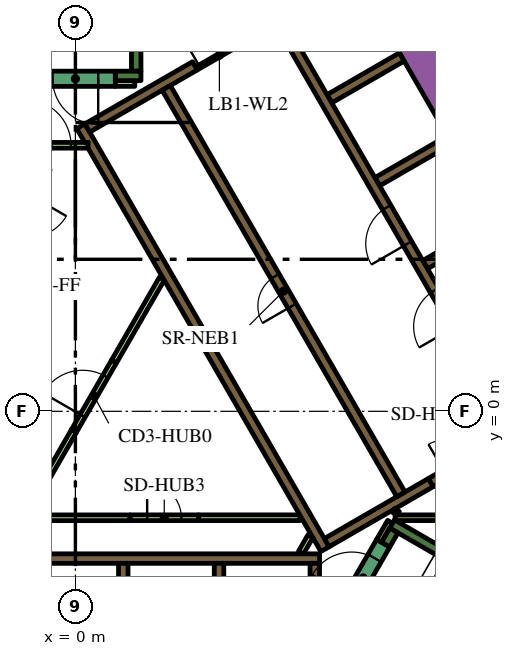
"""IFC4 building model, lengths in metres.
Left out: names, types, materials, properties, quantities, classifications, styles, units other than length and angle.
Written with IfcOpenShell. Run it as: python <this file> out.ifc"""

import sys

from ifc_helpers import new_model, si_unit, direction, frame, frame_2d, origin, place, context, subcontext, project, spatial, polyline, rectangle, outline, extrude, element, fill, save


model = new_model("IFC4")
c1 = context("Model", 3, precision=1e-05, world=origin(), true_north=direction((0.0, 1.0)))
c2 = subcontext(c1, "Body", "Model", "MODEL_VIEW")
j1 = project(units=[si_unit("LENGTHUNIT", "METRE"), si_unit("PLANEANGLEUNIT", "RADIAN")], contexts=[c1])
p1 = place(None, origin())
s1 = spatial("IfcSite", under=j1, at=p1, CompositionType="ELEMENT")
p2 = place(p1, origin())
s2 = spatial("IfcBuilding", under=s1, at=p2, CompositionType="ELEMENT")
p3 = place(p2, frame((0.0, 0.0, 58.8)))
s3 = spatial("IfcBuildingStorey", under=s2, at=p3, CompositionType="ELEMENT", Elevation=58.8)
p4 = place(p3, frame((6.776, 13.364, 0.0), z_axis=(0.0, 0.0, 1.0), x_axis=(0.500004177138, -0.8660229921, 0.0)))
e1 = element("IfcWall", 1, at=p4, inside=s3, PredefinedType="SOLIDWALL", context=c2, shape_type="SweptSolid", body=[
    extrude(rectangle(XDim=20.204, YDim=0.9, at=frame_2d((10.102, 0.0))), origin(), (0.0, 0.0, 1.0), 3.9),
])
p5 = place(p3, frame((8.334, -2.964, 0.0), z_axis=(0.0, 0.0, 1.0), x_axis=(0.866016039709, -0.500016218704, 0.0)))
e2 = element("IfcWall", 2, at=p5, inside=s3, PredefinedType="SOLIDWALL", context=c2, shape_type="SweptSolid", body=[
    extrude(rectangle(XDim=7.05, YDim=0.25, at=frame_2d((3.525, 0.0))), origin(), (0.0, 0.0, 1.0), 3.9),
])
p6 = place(p3, frame((8.163, -3.511, 0.0), z_axis=(0.0, 0.0, 1.0), x_axis=(0.500127794843, 0.865951608824, 0.0)))
e3 = element("IfcWall", 3, at=p6, inside=s3, PredefinedType="SOLIDWALL", context=c2, shape_type="SweptSolid", body=[
    extrude(rectangle(XDim=0.435, YDim=0.25, at=frame_2d((0.217, 0.0))), origin(), (0.0, 0.0, 1.0), 3.9),
])
p7 = place(p3, frame((1.6, 8.95, 0.0), z_axis=(0.0, 0.0, 1.0), x_axis=(0.0, 1.0, 0.0)))
e4 = element("IfcWall", 4, at=p7, inside=s3, PredefinedType="SOLIDWALL", context=c2, shape_type="SweptSolid", body=[
    extrude(rectangle(XDim=6.8, YDim=0.25, at=frame_2d((3.4, 0.0))), origin(), (0.0, 0.0, 1.0), 3.9),
])
p8 = place(p3, frame((1.05, 8.825, 0.0), z_axis=(0.0, 0.0, 1.0), x_axis=(1.0, 0.0, 0.0)))
e5 = element("IfcWall", 5, at=p8, inside=s3, PredefinedType="SOLIDWALL", context=c2, shape_type="SweptSolid", body=[
    extrude(rectangle(XDim=0.675, YDim=0.25, at=frame_2d((0.337, 0.0))), origin(), (0.0, 0.0, 1.0), 3.9),
])
p9 = place(p3, frame((-6.19, -3.875, 0.0), z_axis=(0.0, 0.0, 1.0), x_axis=(1.0, 0.0, 0.0)))
e6 = element("IfcWall", 6, at=p9, inside=s3, PredefinedType="SOLIDWALL", context=c2, shape_type="SweptSolid", body=[
    extrude(rectangle(XDim=12.615, YDim=0.25, at=frame_2d((6.307, 0.0))), origin(), (0.0, 0.0, 1.0), 3.9),
])
p10 = place(p3, frame((6.3, -7.268, 0.0), z_axis=(0.0, 0.0, 1.0), x_axis=(0.0, 1.0, 0.0)))
e7 = element("IfcWall", 7, at=p10, inside=s3, PredefinedType="SOLIDWALL", context=c2, shape_type="SweptSolid", body=[
    extrude(rectangle(XDim=3.268, YDim=0.25, at=frame_2d((1.634, 0.0))), origin(), (0.0, 0.0, 1.0), 3.9),
])
for number, where, z_axis, x_axis in (
    (8, (3.78, -4.0, 0.0), (0.0, 0.0, 1.0), (0.0, -1.0, 0.0)),
    (9, (1.26, -4.0, 0.0), (0.0, 0.0, 1.0), (0.0, -1.0, 0.0)),
):
    element("IfcWall", number, at=place(p3, frame(where, z_axis=z_axis, x_axis=x_axis)), inside=s3, PredefinedType="SOLIDWALL", context=c2, shape_type="SweptSolid", body=[
        extrude(rectangle(XDim=2.2, YDim=0.25, at=frame_2d((1.1, 0.0))), origin(), (0.0, 0.0, 1.0), 3.9),
    ])
p11 = place(p3, origin())
e10 = element("IfcWall", 10, at=p11, inside=s3, PredefinedType="SOLIDWALL", context=c2, shape_type="SweptSolid", body=[
    extrude(outline(polyline([(0.335, 6.925), (0.335, 6.925), (0.335, 7.075), (0.335, 7.075), (0.335, 7.075), (0.245, 7.075), (0.079, 7.363), (0.035, 7.439), (0.252, 7.564), (0.377, 7.348), (6.552, -3.348), (6.677, -3.564), (6.46, -3.689), (4.897, -0.981), (0.332, 6.925), (0.335, 6.925), (0.335, 6.925)])), origin(), (0.0, 0.0, 1.0), 3.9),
])
p12 = place(p3, frame((0.314, 7.456, 0.0), z_axis=(0.0, 0.0, 1.0), x_axis=(0.866013897511, 0.50001992892, 0.0)))
e11 = element("IfcWall", 11, at=p12, inside=s3, PredefinedType="SOLIDWALL", context=c2, shape_type="SweptSolid", body=[
    extrude(rectangle(XDim=3.268, YDim=0.25, at=frame_2d((1.634, 0.0))), origin(), (0.0, 0.0, 1.0), 3.9),
])
p13 = place(p3, frame((9.352, -1.875, 0.0), z_axis=(0.0, 0.0, 1.0), x_axis=(-0.866024844342, -0.500000968981, 0.0)))
e12 = element("IfcWall", 12, at=p13, inside=s3, PredefinedType="SOLIDWALL", context=c2, shape_type="SweptSolid", body=[
    extrude(rectangle(XDim=3.162, YDim=0.25, at=frame_2d((1.581, 0.0))), origin(), (0.0, 0.0, 1.0), 3.9),
])
for number, where, z_axis, x_axis in (
    (13, (6.684, 8.224, 0.0), (0.0, 0.0, 1.0), (0.866, 0.5, 0.0)),
    (14, (7.944, 6.041, 0.0), (0.0, 0.0, 1.0), (0.866, 0.5, 0.0)),
    (15, (9.204, 3.859, 0.0), (0.0, 0.0, 1.0), (0.866, 0.5, 0.0)),
):
    element("IfcWall", number, at=place(p3, frame(where, z_axis=z_axis, x_axis=x_axis)), inside=s3, PredefinedType="SOLIDWALL", context=c2, shape_type="SweptSolid", body=[
        extrude(rectangle(XDim=2.2, YDim=0.25, at=frame_2d((1.1, 0.0))), origin(), (0.0, 0.0, 1.0), 3.9),
    ])
p14 = place(p3, frame((-6.086, -2.801, 0.0), z_axis=(0.0, 0.0, 1.0), x_axis=(1.0, 0.0, 0.0)))
e16 = element("IfcWall", 16, at=p14, inside=s3, PredefinedType="PARTITIONING", context=c2, shape_type="SweptSolid", body=[
    extrude(rectangle(XDim=7.524, YDim=0.15, at=frame_2d((3.762, 0.0))), origin(), (0.0, 0.0, 1.0), 2.75),
])
p15 = place(p3, frame((-1.208, -2.544, 0.0), z_axis=(0.0, 0.0, 1.0), x_axis=(0.499995339376, 0.86602809458, 0.0)))
e17 = element("IfcWall", 17, at=p15, inside=s3, PredefinedType="PARTITIONING", context=c2, shape_type="SweptSolid", body=[
    extrude(rectangle(XDim=2.349, YDim=0.15, at=frame_2d((1.175, 0.0))), origin(), (0.0, 0.0, 1.0), 2.75),
])
p16 = place(p3, frame((5.936, -3.718, 0.0), z_axis=(0.0, 0.0, 1.0), x_axis=(0.499890179513, 0.866088799389, 0.0)))
e18 = element("IfcWall", 18, at=p16, inside=s3, PredefinedType="PARTITIONING", context=c2, shape_type="SweptSolid", body=[
    extrude(rectangle(XDim=0.504, YDim=0.15, at=frame_2d((0.252, 0.0))), origin(), (0.0, 0.0, 1.0), 2.75),
])
p17 = place(p3, frame((8.412, -2.8, 0.0), z_axis=(0.0, 0.0, 1.0), x_axis=(1.0, 0.0, 0.0)))
e19 = element("IfcWall", 19, at=p17, inside=s3, PredefinedType="PARTITIONING", context=c2, shape_type="SweptSolid", body=[
    extrude(rectangle(XDim=2.702, YDim=0.15, at=frame_2d((1.351, 0.0))), origin(), (0.0, 0.0, 1.0), 3.9),
])
p18 = place(p3, frame((8.459, -2.599, 0.0), z_axis=(0.0, 0.0, 1.0), x_axis=(-0.501919277433, -0.864914469148, 0.0)))
e20 = element("IfcWall", 20, at=p18, inside=s3, PredefinedType="PARTITIONING", context=c2, shape_type="SweptSolid", body=[
    extrude(rectangle(XDim=0.109, YDim=0.15, at=frame_2d((0.054, 0.0))), origin(), (0.0, 0.0, 1.0), 3.9),
])
p19 = place(p3, frame((8.281, -2.907, 0.0), z_axis=(0.0, 0.0, 1.0), x_axis=(-0.500193841991, -0.86591346013, 0.0)))
e21 = element("IfcWall", 21, at=p19, inside=s3, PredefinedType="PARTITIONING", context=c2, shape_type="SweptSolid", body=[
    extrude(rectangle(XDim=0.583, YDim=0.15, at=frame_2d((0.292, 0.0))), origin(), (0.0, 0.0, 1.0), 3.9),
])
p20 = place(p3, frame((3.238, -2.8, 0.0), z_axis=(0.0, 0.0, 1.0), x_axis=(1.0, 0.0, 0.0)))
e22 = element("IfcWall", 22, at=p20, inside=s3, PredefinedType="PARTITIONING", context=c2, shape_type="SweptSolid", body=[
    extrude(rectangle(XDim=2.672, YDim=0.15, at=frame_2d((1.336, 0.0))), origin(), (0.0, 0.0, 1.0), 2.75),
])
p21 = place(p3, frame((1.016, 1.309, 0.0), z_axis=(0.0, 0.0, 1.0), x_axis=(0.49998231768, 0.866035612436, 0.0)))
e23 = element("IfcWall", 23, at=p21, inside=s3, PredefinedType="PARTITIONING", context=c2, shape_type="SweptSolid", body=[
    extrude(rectangle(XDim=2.521, YDim=0.15, at=frame_2d((1.26, 0.0))), origin(), (0.0, 0.0, 1.0), 2.75),
])
p22 = place(p3, frame((1.05, 8.625, 0.0), z_axis=(0.0, 0.0, 1.0), x_axis=(1.0, 0.0, 0.0)))
e24 = element("IfcWall", 24, at=p22, inside=s3, PredefinedType="PARTITIONING", context=c2, shape_type="SweptSolid", body=[
    extrude(rectangle(XDim=0.514, YDim=0.15, at=frame_2d((0.257, 0.0))), origin(), (0.0, 0.0, 1.0), 2.75),
])
p23 = place(p3, frame((11.553, -0.46, 0.0), z_axis=(0.0, 0.0, 1.0), x_axis=(-0.500006514828, 0.866021642414, 0.0)))
e25 = element("IfcWall", 25, at=p23, inside=s3, PredefinedType="SOLIDWALL", context=c2, shape_type="SweptSolid", body=[
    extrude(rectangle(XDim=12.35, YDim=0.25, at=frame_2d((6.175, 0.0))), origin(), (0.0, 0.0, 1.0), 3.9),
])
p24 = place(p23, frame((0.585, 0.0, 0.0)))
e26 = element("IfcOpeningElement", 26, at=p24, cuts=e25, PredefinedType="OPENING", context=c2, shape_type="SweptSolid", body=[
    extrude(rectangle(XDim=1.1, YDim=2.1, at=frame_2d((0.55, 1.05))), frame((0.0, 0.135, 0.0), z_axis=(0.0, -1.0, 0.0), x_axis=(1.0, 0.0, 0.0)), (0.0, 0.0, 1.0), 0.27),
])
p25 = place(p23, frame((3.105, 0.0, 0.0)))
e27 = element("IfcOpeningElement", 27, at=p25, cuts=e25, PredefinedType="OPENING", context=c2, shape_type="SweptSolid", body=[
    extrude(rectangle(XDim=1.1, YDim=2.1, at=frame_2d((0.55, 1.05))), frame((0.0, 0.135, 0.0), z_axis=(0.0, -1.0, 0.0), x_axis=(1.0, 0.0, 0.0)), (0.0, 0.0, 1.0), 0.27),
])
p26 = place(p23, frame((5.625, 0.0, 0.0)))
e28 = element("IfcOpeningElement", 28, at=p26, cuts=e25, PredefinedType="OPENING", context=c2, shape_type="SweptSolid", body=[
    extrude(rectangle(XDim=1.1, YDim=2.1, at=frame_2d((0.55, 1.05))), frame((0.0, 0.135, 0.0), z_axis=(0.0, -1.0, 0.0), x_axis=(1.0, 0.0, 0.0)), (0.0, 0.0, 1.0), 0.27),
])
p27 = place(p3, frame((8.565, -2.185, 0.0), z_axis=(0.0, 0.0, 1.0), x_axis=(-0.499997954832, 0.866026584559, 0.0)))
e29 = element("IfcWall", 29, at=p27, inside=s3, PredefinedType="SOLIDWALL", context=c2, shape_type="SweptSolid", body=[
    extrude(rectangle(XDim=12.35, YDim=0.25, at=frame_2d((6.175, 0.0))), origin(), (0.0, 0.0, 1.0), 3.9),
])
p28 = place(p27, frame((5.725, 0.0, 0.0)))
e30 = element("IfcOpeningElement", 30, at=p28, cuts=e29, PredefinedType="OPENING", context=c2, shape_type="SweptSolid", body=[
    extrude(rectangle(XDim=0.9, YDim=2.1, at=frame_2d((0.45, 1.05))), frame((0.0, 0.135, 0.0), z_axis=(0.0, -1.0, 0.0), x_axis=(1.0, 0.0, 0.0)), (0.0, 0.0, 1.0), 0.27),
])
p29 = place(p3, frame((7.048, -5.292, 0.0), z_axis=(0.0, 0.0, 1.0), x_axis=(0.49994051562, 0.866059744384, 0.0)))
e31 = element("IfcWall", 31, at=p29, inside=s3, PredefinedType="SOLIDWALL", context=c2, shape_type="SweptSolid", body=[
    extrude(rectangle(XDim=2.1, YDim=0.4, at=frame_2d((1.05, 0.0))), origin(), (0.0, 0.0, 1.0), 3.9),
])
p30 = place(p29, frame((0.45, 0.0, 0.0)))
e32 = element("IfcOpeningElement", 32, at=p30, cuts=e31, PredefinedType="OPENING", context=c2, shape_type="SweptSolid", body=[
    extrude(rectangle(XDim=1.2, YDim=2.1, at=frame_2d((0.6, 1.05))), frame((0.0, 0.21, 0.0), z_axis=(0.0, -1.0, 0.0), x_axis=(1.0, 0.0, 0.0)), (0.0, 0.0, 1.0), 0.42),
])
p31 = place(p3, frame((1.05, 8.75, 0.0), z_axis=(0.0, 0.0, 1.0), x_axis=(-1.0, 0.0, 0.0)))
e33 = element("IfcWall", 33, at=p31, inside=s3, PredefinedType="SOLIDWALL", context=c2, shape_type="SweptSolid", body=[
    extrude(rectangle(XDim=2.1, YDim=0.4, at=frame_2d((1.05, 0.0))), origin(), (0.0, 0.0, 1.0), 3.9),
])
p32 = place(p31, frame((0.45, 0.0, 0.0)))
e34 = element("IfcOpeningElement", 34, at=p32, cuts=e33, PredefinedType="OPENING", context=c2, shape_type="SweptSolid", body=[
    extrude(rectangle(XDim=1.2, YDim=2.1, at=frame_2d((0.6, 1.05))), frame((0.0, 0.21, 0.0), z_axis=(0.0, -1.0, 0.0), x_axis=(1.0, 0.0, 0.0)), (0.0, 0.0, 1.0), 0.42),
])
p33 = place(p3, frame((-1.765, 7.0, 0.0), z_axis=(0.0, 0.0, 1.0), x_axis=(1.0, 0.0, 0.0)))
e35 = element("IfcWall", 35, at=p33, inside=s3, PredefinedType="PARTITIONING", context=c2, shape_type="SweptSolid", body=[
    extrude(rectangle(XDim=2.1, YDim=0.15, at=frame_2d((1.05, 0.0))), origin(), (0.0, 0.0, 1.0), 2.75),
])
p34 = place(p33, frame((0.45, 0.0, 0.0)))
e36 = element("IfcOpeningElement", 36, at=p34, cuts=e35, PredefinedType="OPENING", context=c2, shape_type="SweptSolid", body=[
    extrude(rectangle(XDim=1.2, YDim=2.1, at=frame_2d((0.6, 1.05))), frame((0.0, 0.085, 0.0), z_axis=(0.0, -1.0, 0.0), x_axis=(1.0, 0.0, 0.0)), (0.0, 0.0, 1.0), 0.17),
])
p35 = place(p3, frame((-0.034, -0.509, 0.0), z_axis=(0.0, 0.0, 1.0), x_axis=(0.49994051562, 0.866059744384, 0.0)))
e37 = element("IfcWall", 37, at=p35, inside=s3, PredefinedType="PARTITIONING", context=c2, shape_type="SweptSolid", body=[
    extrude(rectangle(XDim=2.1, YDim=0.15, at=frame_2d((1.05, 0.0))), origin(), (0.0, 0.0, 1.0), 2.75),
])
p36 = place(p35, frame((0.45, 0.0, 0.0)))
e38 = element("IfcOpeningElement", 38, at=p36, cuts=e37, PredefinedType="OPENING", context=c2, shape_type="SweptSolid", body=[
    extrude(rectangle(XDim=1.2, YDim=2.1, at=frame_2d((0.6, 1.05))), frame((0.0, 0.085, 0.0), z_axis=(0.0, -1.0, 0.0), x_axis=(1.0, 0.0, 0.0)), (0.0, 0.0, 1.0), 0.17),
])
p37 = place(p3, frame((3.183, 9.02, 0.0), z_axis=(0.0, 0.0, 1.0), x_axis=(0.866034573852, 0.49998411664, 0.0)))
e39 = element("IfcWall", 39, at=p37, inside=s3, PredefinedType="PARTITIONING", context=c2, shape_type="SweptSolid", body=[
    extrude(rectangle(XDim=1.4, YDim=0.09, at=frame_2d((0.7, 0.0))), origin(), (0.0, 0.0, 1.0), 2.75),
])
p38 = place(p37, frame((0.1, 0.0, 0.0)))
e40 = element("IfcOpeningElement", 40, at=p38, cuts=e39, PredefinedType="OPENING", context=c2, shape_type="SweptSolid", body=[
    extrude(rectangle(XDim=1.2, YDim=2.1, at=frame_2d((0.6, 1.05))), frame((0.0, 0.055, 0.0), z_axis=(0.0, -1.0, 0.0), x_axis=(1.0, 0.0, 0.0)), (0.0, 0.0, 1.0), 0.11),
])
p39 = place(p3, frame((9.352, -1.875, 0.0), z_axis=(0.0, 0.0, 1.0), x_axis=(0.865989075817, 0.500062916607, 0.0)))
e41 = element("IfcWall", 41, at=p39, inside=s3, PredefinedType="SOLIDWALL", context=c2, shape_type="SweptSolid", body=[
    extrude(rectangle(XDim=1.8, YDim=0.25, at=frame_2d((0.9, 0.0))), origin(), (0.0, 0.0, 1.0), 3.9),
])
p40 = place(p39, frame((0.45, 0.0, 0.0)))
e42 = element("IfcOpeningElement", 42, at=p40, cuts=e41, PredefinedType="OPENING", context=c2, shape_type="SweptSolid", body=[
    extrude(rectangle(XDim=0.9, YDim=2.1, at=frame_2d((0.45, 1.05))), frame((0.0, 0.135, 0.0), z_axis=(0.0, -1.0, 0.0), x_axis=(1.0, 0.0, 0.0)), (0.0, 0.0, 1.0), 0.27),
])
p41 = place(p3, frame((1.438, -2.8, 0.0), z_axis=(0.0, 0.0, 1.0), x_axis=(1.0, 0.0, 0.0)))
e43 = element("IfcWall", 43, at=p41, inside=s3, PredefinedType="PARTITIONING", context=c2, shape_type="SweptSolid", body=[
    extrude(rectangle(XDim=1.8, YDim=0.15, at=frame_2d((0.9, 0.0))), origin(), (0.0, 0.0, 1.0), 2.75),
])
p42 = place(p41, frame((0.45, 0.0, 0.0)))
e44 = element("IfcOpeningElement", 44, at=p42, cuts=e43, PredefinedType="OPENING", context=c2, shape_type="SweptSolid", body=[
    extrude(rectangle(XDim=0.9, YDim=2.1, at=frame_2d((0.45, 1.05))), frame((0.0, 0.085, 0.0), z_axis=(0.0, -1.0, 0.0), x_axis=(1.0, 0.0, 0.0)), (0.0, 0.0, 1.0), 0.17),
])
p43 = place(p3, frame((6.163, 18.475, 0.0), z_axis=(0.0, 0.0, 1.0), x_axis=(0.500001317485, -0.866024643133, 0.0)))
e45 = element("IfcWall", 45, at=p43, inside=s3, PredefinedType="PARTITIONING", context=c2, shape_type="SweptSolid", body=[
    extrude(rectangle(XDim=25.767, YDim=0.15, at=frame_2d((12.883, 0.0))), origin(), (0.0, 0.0, 1.0), 2.75),
])
p44 = place(p43, frame((24.586, 0.0, 0.0)))
e46 = element("IfcOpeningElement", 46, at=p44, cuts=e45, PredefinedType="OPENING", context=c2, shape_type="SweptSolid", body=[
    extrude(rectangle(XDim=1.0, YDim=2.1, at=frame_2d((0.5, 1.05))), frame((0.0, 0.085, 0.0), z_axis=(0.0, -1.0, 0.0), x_axis=(1.0, 0.0, 0.0)), (0.0, 0.0, 1.0), 0.17),
])
p45 = place(p43, frame((13.144, 0.0, 0.0)))
e47 = element("IfcOpeningElement", 47, at=p45, cuts=e45, PredefinedType="OPENING", context=c2, shape_type="SweptSolid", body=[
    extrude(rectangle(XDim=1.0, YDim=2.1, at=frame_2d((0.5, 1.05))), frame((0.0, 0.085, 0.0), z_axis=(0.0, -1.0, 0.0), x_axis=(1.0, 0.0, 0.0)), (0.0, 0.0, 1.0), 0.17),
])
p46 = place(p43, frame((11.692, 0.0, 0.0)))
e48 = element("IfcOpeningElement", 48, at=p46, cuts=e45, PredefinedType="OPENING", context=c2, shape_type="SweptSolid", body=[
    extrude(rectangle(XDim=1.0, YDim=2.1, at=frame_2d((0.5, 1.05))), frame((0.0, 0.085, 0.0), z_axis=(0.0, -1.0, 0.0), x_axis=(1.0, 0.0, 0.0)), (0.0, 0.0, 1.0), 0.17),
])
p47 = place(p43, frame((0.572, 0.0, 0.0)))
e49 = element("IfcOpeningElement", 49, at=p47, cuts=e45, PredefinedType="OPENING", context=c2, shape_type="SweptSolid", body=[
    extrude(rectangle(XDim=1.0, YDim=2.1, at=frame_2d((0.5, 1.05))), frame((0.0, 0.085, 0.0), z_axis=(0.0, -1.0, 0.0), x_axis=(1.0, 0.0, 0.0)), (0.0, 0.0, 1.0), 0.17),
])
p48 = place(p25, origin())
e50 = element("IfcDoor", 50, at=p48, inside=s3, OperationType="DOUBLE_DOOR_SLIDING", PredefinedType="DOOR", context=c2, shape_type="SweptSolid", body=[
    extrude(rectangle(XDim=1.1, YDim=2.1, at=frame_2d((0.55, 1.05))), frame((0.0, 0.025, 0.0), z_axis=(0.0, -1.0, 0.0), x_axis=(1.0, 0.0, 0.0)), (0.0, 0.0, 1.0), 0.05),
])
fill(e27, e50)
p49 = place(p26, origin())
e51 = element("IfcDoor", 51, at=p49, inside=s3, OperationType="DOUBLE_DOOR_SLIDING", PredefinedType="DOOR", context=c2, shape_type="SweptSolid", body=[
    extrude(rectangle(XDim=1.1, YDim=2.1, at=frame_2d((0.55, 1.05))), frame((0.0, 0.025, 0.0), z_axis=(0.0, -1.0, 0.0), x_axis=(1.0, 0.0, 0.0)), (0.0, 0.0, 1.0), 0.05),
])
fill(e28, e51)
p50 = place(p28, origin())
e52 = element("IfcDoor", 52, at=p50, inside=s3, OperationType="SINGLE_SWING_LEFT", PredefinedType="DOOR", context=c2, shape_type="SweptSolid", body=[
    extrude(rectangle(XDim=0.9, YDim=2.1, at=frame_2d((0.45, 1.05))), frame((0.0, 0.025, 0.0), z_axis=(0.0, -1.0, 0.0), x_axis=(1.0, 0.0, 0.0)), (0.0, 0.0, 1.0), 0.05),
])
fill(e30, e52)
p51 = place(p30, origin())
e53 = element("IfcDoor", 53, at=p51, inside=s3, OperationType="SINGLE_SWING_LEFT", PredefinedType="DOOR", context=c2, shape_type="SweptSolid", body=[
    extrude(rectangle(XDim=1.2, YDim=2.1, at=frame_2d((0.6, 1.05))), frame((0.0, 0.025, 0.0), z_axis=(0.0, -1.0, 0.0), x_axis=(1.0, 0.0, 0.0)), (0.0, 0.0, 1.0), 0.05),
])
fill(e32, e53)
p52 = place(p32, origin())
e54 = element("IfcDoor", 54, at=p52, inside=s3, OperationType="SINGLE_SWING_LEFT", PredefinedType="DOOR", context=c2, shape_type="SweptSolid", body=[
    extrude(rectangle(XDim=1.2, YDim=2.1, at=frame_2d((0.6, 1.05))), frame((0.0, 0.025, 0.0), z_axis=(0.0, -1.0, 0.0), x_axis=(1.0, 0.0, 0.0)), (0.0, 0.0, 1.0), 0.05),
])
fill(e34, e54)
p53 = place(p34, origin())
e55 = element("IfcDoor", 55, at=p53, inside=s3, OperationType="SINGLE_SWING_LEFT", PredefinedType="DOOR", context=c2, shape_type="SweptSolid", body=[
    extrude(rectangle(XDim=1.2, YDim=2.1, at=frame_2d((0.6, 1.05))), frame((0.0, 0.025, 0.0), z_axis=(0.0, -1.0, 0.0), x_axis=(1.0, 0.0, 0.0)), (0.0, 0.0, 1.0), 0.05),
])
fill(e36, e55)
p54 = place(p36, origin())
e56 = element("IfcDoor", 56, at=p54, inside=s3, OperationType="SINGLE_SWING_LEFT", PredefinedType="DOOR", context=c2, shape_type="SweptSolid", body=[
    extrude(rectangle(XDim=1.2, YDim=2.1, at=frame_2d((0.6, 1.05))), frame((0.0, 0.025, 0.0), z_axis=(0.0, -1.0, 0.0), x_axis=(1.0, 0.0, 0.0)), (0.0, 0.0, 1.0), 0.05),
])
fill(e38, e56)
p55 = place(p38, origin())
e57 = element("IfcDoor", 57, at=p55, inside=s3, OperationType="SINGLE_SWING_LEFT", PredefinedType="DOOR", context=c2, shape_type="SweptSolid", body=[
    extrude(rectangle(XDim=1.2, YDim=2.1, at=frame_2d((0.6, 1.05))), frame((0.0, 0.025, 0.0), z_axis=(0.0, -1.0, 0.0), x_axis=(1.0, 0.0, 0.0)), (0.0, 0.0, 1.0), 0.05),
])
fill(e40, e57)
p56 = place(p42, origin())
e58 = element("IfcDoor", 58, at=p56, inside=s3, OperationType="SINGLE_SWING_LEFT", PredefinedType="DOOR", context=c2, shape_type="SweptSolid", body=[
    extrude(rectangle(XDim=0.9, YDim=2.1, at=frame_2d((0.45, 1.05))), frame((0.0, 0.025, 0.0), z_axis=(0.0, -1.0, 0.0), x_axis=(1.0, 0.0, 0.0)), (0.0, 0.0, 1.0), 0.05),
])
fill(e44, e58)
save(model, sys.argv[1])
